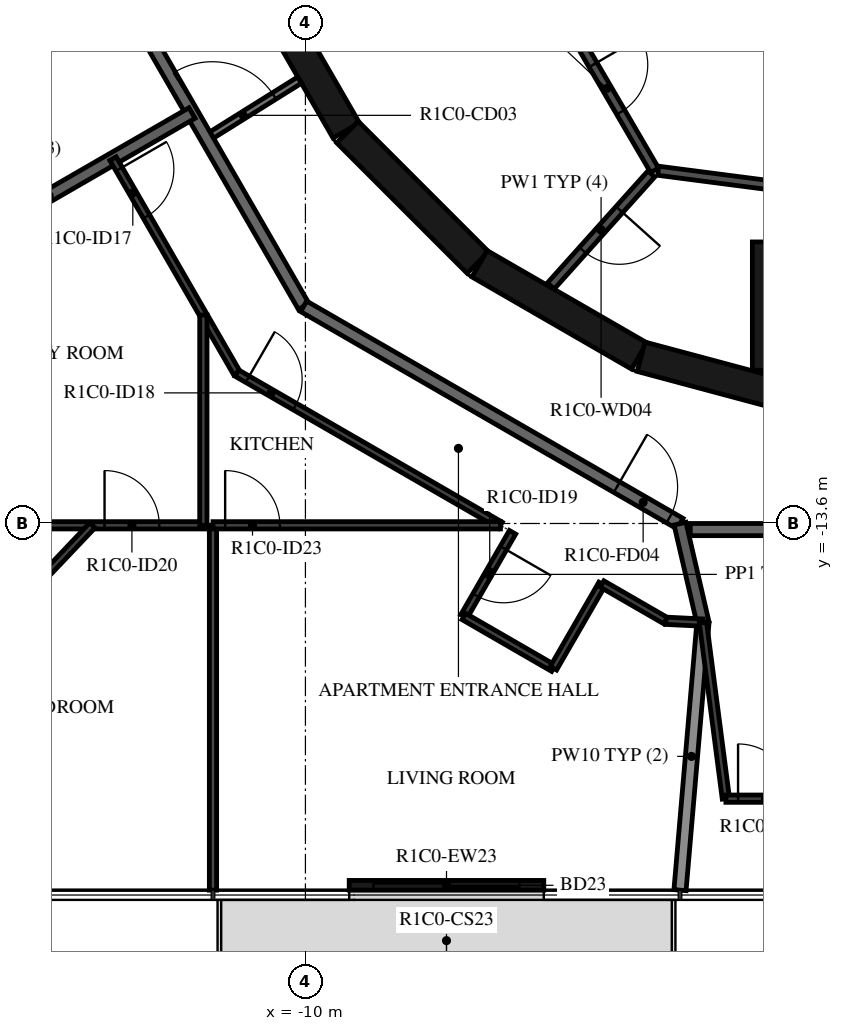
"""IFC4 building model, lengths in metres.
Left out: names, types, materials, properties, quantities, classifications, styles, units other than length and angle.
Written with IfcOpenShell. Run it as: python <this file> out.ifc"""

import sys

from ifc_helpers import new_model, si_unit, direction, frame, frame_2d, origin, place, context, subcontext, project, spatial, rectangle, extrude, element, fill, save


model = new_model("IFC4")
c1 = context("Model", 3, precision=1e-05, world=origin(), true_north=direction((0.0, 1.0)))
c2 = subcontext(c1, "Body", "Model", "MODEL_VIEW")
j1 = project(units=[si_unit("LENGTHUNIT", "METRE"), si_unit("PLANEANGLEUNIT", "RADIAN")], contexts=[c1])
p1 = place(None, origin())
s1 = spatial("IfcSite", under=j1, at=p1, CompositionType="ELEMENT")
p2 = place(p1, origin())
s2 = spatial("IfcBuilding", under=s1, at=p2, CompositionType="ELEMENT")
p3 = place(p2, frame((0.0, 0.0, 59.4)))
s3 = spatial("IfcBuildingStorey", under=s2, at=p3, CompositionType="ELEMENT", Elevation=59.4)
p4 = place(p3, frame((-9.28, -19.55, 0.0), z_axis=(0.0, 0.0, 1.0), x_axis=(1.0, 0.0, 0.0)))
e1 = element("IfcWall", 1, at=p4, inside=s3, PredefinedType="STANDARD", context=c2, shape_type="SweptSolid", body=[
    extrude(rectangle(XDim=3.2, YDim=0.16, at=frame_2d((1.6, 0.0))), origin(), (0.0, 0.0, 1.0), 3.12),
])
p5 = place(p4, frame((0.4, 0.0, 0.0)))
e2 = element("IfcOpeningElement", 2, at=p5, cuts=e1, PredefinedType="OPENING", context=c2, shape_type="SweptSolid", body=[
    extrude(rectangle(XDim=2.4, YDim=2.4, at=frame_2d((1.2, 1.2))), frame((0.0, 0.09, 0.0), z_axis=(0.0, -1.0, 0.0), x_axis=(1.0, 0.0, 0.0)), (0.0, 0.0, 1.0), 0.18),
])
p6 = place(p3, frame((-10.845, -4.51, 0.0), z_axis=(0.0, 0.0, 1.0), x_axis=(0.500087131594, -0.865975092491, 0.0)))
e3 = element("IfcWall", 3, at=p6, inside=s3, PredefinedType="SHEAR", context=c2, shape_type="SweptSolid", body=[
    extrude(rectangle(XDim=3.033, YDim=0.5, at=frame_2d((1.516, 0.0))), origin(), (0.0, 0.0, 1.0), 3.12),
])
p7 = place(p3, frame((-9.308, -7.164, 0.0), z_axis=(0.0, 0.0, 1.0), x_axis=(0.707106781187, -0.707106781187, 0.0)))
e4 = element("IfcWall", 4, at=p7, inside=s3, PredefinedType="SHEAR", context=c2, shape_type="SweptSolid", body=[
    extrude(rectangle(XDim=3.032, YDim=0.5, at=frame_2d((1.516, 0.0))), origin(), (0.0, 0.0, 1.0), 3.12),
])
for number, where, z_axis, x_axis in (
    (5, (-7.137, -9.329, 0.0), (0.0, 0.0, 1.0), (0.866, -0.5, 0.0)),
    (6, (-4.479, -10.858, 0.0), (0.0, 0.0, 1.0), (0.966, -0.259, 0.0)),
):
    element("IfcWall", number, at=place(p3, frame(where, z_axis=z_axis, x_axis=x_axis)), inside=s3, PredefinedType="SHEAR", context=c2, shape_type="SweptSolid", body=[
        extrude(rectangle(XDim=3.033, YDim=0.5, at=frame_2d((1.516, 0.0))), origin(), (0.0, 0.0, 1.0), 3.12),
    ])
p8 = place(p3, frame((-2.525, -8.97, 0.0), z_axis=(0.0, 0.0, 1.0), x_axis=(0.0, -1.0, 0.0)))
e7 = element("IfcWall", 7, at=p8, inside=s3, PredefinedType="SHEAR", context=c2, shape_type="SweptSolid", body=[
    extrude(rectangle(XDim=2.11, YDim=0.25, at=frame_2d((1.055, 0.0))), origin(), (0.0, 0.0, 1.0), 3.12),
])
p9 = place(p3, frame((-5.829, -5.102, 0.0), z_axis=(0.0, 0.0, 1.0), x_axis=(0.504480008384, -0.863423373057, 0.0)))
e8 = element("IfcWall", 8, at=p9, inside=s3, PredefinedType="PARTITIONING", context=c2, shape_type="SweptSolid", body=[
    extrude(rectangle(XDim=3.115, YDim=0.15, at=frame_2d((1.558, 0.0))), origin(), (0.0, 0.0, 1.0), 3.12),
])
p10 = place(p9, frame((1.107, 0.0, 0.0)))
e9 = element("IfcOpeningElement", 9, at=p10, cuts=e8, PredefinedType="OPENING", context=c2, shape_type="SweptSolid", body=[
    extrude(rectangle(XDim=0.9, YDim=2.1, at=frame_2d((0.45, 1.05))), frame((0.0, 0.085, 0.0), z_axis=(0.0, -1.0, 0.0), x_axis=(1.0, 0.0, 0.0)), (0.0, 0.0, 1.0), 0.17),
])
p11 = place(p3, frame((-4.311, -7.851, 0.0), z_axis=(0.0, 0.0, 1.0), x_axis=(-0.667869133096, -0.744278725383, 0.0)))
e10 = element("IfcWall", 10, at=p11, inside=s3, PredefinedType="PARTITIONING", context=c2, shape_type="SweptSolid", body=[
    extrude(rectangle(XDim=2.476, YDim=0.15, at=frame_2d((1.238, 0.0))), origin(), (0.0, 0.0, 1.0), 3.12),
])
p12 = place(p11, frame((0.788, 0.0, 0.0)))
e11 = element("IfcOpeningElement", 11, at=p12, cuts=e10, PredefinedType="OPENING", context=c2, shape_type="SweptSolid", body=[
    extrude(rectangle(XDim=0.9, YDim=2.1, at=frame_2d((0.45, 1.05))), frame((0.0, 0.085, 0.0), z_axis=(0.0, -1.0, 0.0), x_axis=(1.0, 0.0, 0.0)), (0.0, 0.0, 1.0), 0.17),
])
p13 = place(p3, frame((-4.198, -7.799, 0.0), z_axis=(0.0, 0.0, 1.0), x_axis=(0.991686747293, -0.128675542523, 0.0)))
e12 = element("IfcWall", 12, at=p13, inside=s3, PredefinedType="PARTITIONING", context=c2, shape_type="SweptSolid", body=[
    extrude(rectangle(XDim=1.793, YDim=0.15, at=frame_2d((0.896, 0.0))), origin(), (0.0, 0.0, 1.0), 3.12),
])
p14 = place(p3, frame((-11.625, -7.264, 0.0), z_axis=(0.0, 0.0, 1.0), x_axis=(0.84803632456, 0.529938102259, 0.0)))
e13 = element("IfcWall", 13, at=p14, inside=s3, PredefinedType="PARTITIONING", context=c2, shape_type="SweptSolid", body=[
    extrude(rectangle(XDim=1.804, YDim=0.12, at=frame_2d((0.902, 0.0))), origin(), (0.0, 0.0, 1.0), 3.12),
])
p15 = place(p14, frame((0.11, 0.0, 0.0)))
e14 = element("IfcOpeningElement", 14, at=p15, cuts=e13, PredefinedType="OPENING", context=c2, shape_type="SweptSolid", body=[
    extrude(rectangle(XDim=1.2, YDim=2.1, at=frame_2d((0.6, 1.05))), frame((0.0, 0.07, 0.0), z_axis=(0.0, -1.0, 0.0), x_axis=(1.0, 0.0, 0.0)), (0.0, 0.0, 1.0), 0.14),
])
p16 = place(p3, frame((-13.7, -3.671, 0.0), z_axis=(0.0, 0.0, 1.0), x_axis=(0.500001669485, -0.866024439905, 0.0)))
e15 = element("IfcWall", 15, at=p16, inside=s3, PredefinedType="STANDARD", context=c2, shape_type="SweptSolid", body=[
    extrude(rectangle(XDim=7.342, YDim=0.2, at=frame_2d((3.671, 0.0))), origin(), (0.0, 0.0, 1.0), 3.12),
])
p17 = place(p3, frame((-10.029, -10.029, 0.0), z_axis=(0.0, 0.0, 1.0), x_axis=(0.866022878987, -0.500004373052, 0.0)))
e16 = element("IfcWall", 16, at=p17, inside=s3, PredefinedType="STANDARD", context=c2, shape_type="SweptSolid", body=[
    extrude(rectangle(XDim=7.146, YDim=0.2, at=frame_2d((3.573, 0.0))), origin(), (0.0, 0.0, 1.0), 3.12),
])
p18 = place(p17, frame((5.947, 0.0, 0.0)))
e17 = element("IfcOpeningElement", 17, at=p18, cuts=e16, PredefinedType="OPENING", context=c2, shape_type="SweptSolid", body=[
    extrude(rectangle(XDim=1.0, YDim=2.1, at=frame_2d((0.5, 1.05))), frame((0.0, 0.11, 0.0), z_axis=(0.0, -1.0, 0.0), x_axis=(1.0, 0.0, 0.0)), (0.0, 0.0, 1.0), 0.22),
])
p19 = place(p3, frame((-3.671, -13.7, 0.0), z_axis=(0.0, 0.0, 1.0), x_axis=(1.0, 0.0, 0.0)))
e18 = element("IfcWall", 18, at=p19, inside=s3, PredefinedType="STANDARD", context=c2, shape_type="SweptSolid", body=[
    extrude(rectangle(XDim=7.342, YDim=0.2, at=frame_2d((3.671, 0.0))), origin(), (0.0, 0.0, 1.0), 3.12),
])
p20 = place(p19, frame((2.1, 0.0, 0.0)))
e19 = element("IfcOpeningElement", 19, at=p20, cuts=e18, PredefinedType="OPENING", context=c2, shape_type="SweptSolid", body=[
    extrude(rectangle(XDim=1.0, YDim=2.1, at=frame_2d((0.5, 1.05))), frame((0.0, 0.11, 0.0), z_axis=(0.0, -1.0, 0.0), x_axis=(1.0, 0.0, 0.0)), (0.0, 0.0, 1.0), 0.22),
])
p21 = place(p3, frame((-16.565, -9.564, 0.0), z_axis=(0.0, 0.0, 1.0), x_axis=(0.866028274568, 0.499995027624, 0.0)))
e20 = element("IfcWall", 20, at=p21, inside=s3, PredefinedType="STANDARD", context=c2, shape_type="SweptSolid", body=[
    extrude(rectangle(XDim=5.427, YDim=0.2, at=frame_2d((2.714, 0.0))), origin(), (0.0, 0.0, 1.0), 3.12),
])
p22 = place(p3, frame((-3.463, -15.23, 0.0), z_axis=(0.0, 0.0, 1.0), x_axis=(-0.225894501138, 0.974151771725, 0.0)))
e21 = element("IfcWall", 21, at=p22, inside=s3, PredefinedType="STANDARD", context=c2, shape_type="SweptSolid", body=[
    extrude(rectangle(XDim=1.671, YDim=0.2, at=frame_2d((0.835, 0.0))), origin(), (0.0, 0.0, 1.0), 3.12),
])
p23 = place(p3, frame((-3.84, -19.63, 0.0), z_axis=(0.0, 0.0, 1.0), x_axis=(0.085470135005, 0.996340732893, 0.0)))
e22 = element("IfcWall", 22, at=p23, inside=s3, PredefinedType="STANDARD", context=c2, shape_type="SweptSolid", body=[
    extrude(rectangle(XDim=4.416, YDim=0.2, at=frame_2d((2.208, 0.0))), origin(), (0.0, 0.0, 1.0), 2.73),
])
p24 = place(p3, frame((-13.164, -7.6, 0.0), z_axis=(0.0, 0.0, 1.0), x_axis=(0.500000928893, -0.866024867487, 0.0)))
e23 = element("IfcWall", 23, at=p24, inside=s3, PredefinedType="PARTITIONING", context=c2, shape_type="SweptSolid", body=[
    extrude(rectangle(XDim=4.073, YDim=0.12, at=frame_2d((2.036, 0.0))), origin(), (0.0, 0.0, 1.0), 3.12),
])
p25 = place(p24, frame((0.2, 0.0, 0.0)))
e24 = element("IfcOpeningElement", 24, at=p25, cuts=e23, PredefinedType="OPENING", context=c2, shape_type="SweptSolid", body=[
    extrude(rectangle(XDim=0.9, YDim=2.1, at=frame_2d((0.45, 1.05))), frame((0.0, 0.07, 0.0), z_axis=(0.0, -1.0, 0.0), x_axis=(1.0, 0.0, 0.0)), (0.0, 0.0, 1.0), 0.14),
])
p26 = place(p3, frame((-11.127, -11.127, 0.0), z_axis=(0.0, 0.0, 1.0), x_axis=(0.866034514313, -0.499984219769, 0.0)))
e25 = element("IfcWall", 25, at=p26, inside=s3, PredefinedType="PARTITIONING", context=c2, shape_type="SweptSolid", body=[
    extrude(rectangle(XDim=5.006, YDim=0.12, at=frame_2d((2.503, 0.0))), origin(), (0.0, 0.0, 1.0), 3.12),
])
p27 = place(p26, frame((0.2, 0.0, 0.0)))
e26 = element("IfcOpeningElement", 26, at=p27, cuts=e25, PredefinedType="OPENING", context=c2, shape_type="SweptSolid", body=[
    extrude(rectangle(XDim=0.9, YDim=2.1, at=frame_2d((0.45, 1.05))), frame((0.0, 0.07, 0.0), z_axis=(0.0, -1.0, 0.0), x_axis=(1.0, 0.0, 0.0)), (0.0, 0.0, 1.0), 0.14),
])
p28 = place(p3, frame((-6.594, -13.744, 0.0), z_axis=(0.0, 0.0, 1.0), x_axis=(-0.499947031044, -0.866055983265, 0.0)))
e27 = element("IfcWall", 27, at=p28, inside=s3, PredefinedType="PARTITIONING", context=c2, shape_type="SweptSolid", body=[
    extrude(rectangle(XDim=1.6, YDim=0.12, at=frame_2d((0.8, 0.0))), origin(), (0.0, 0.0, 1.0), 3.12),
])
p29 = place(p28, frame((0.3, 0.0, 0.0)))
e28 = element("IfcOpeningElement", 28, at=p29, cuts=e27, PredefinedType="OPENING", context=c2, shape_type="SweptSolid", body=[
    extrude(rectangle(XDim=0.9, YDim=2.1, at=frame_2d((0.45, 1.05))), frame((0.0, 0.07, 0.0), z_axis=(0.0, -1.0, 0.0), x_axis=(1.0, 0.0, 0.0)), (0.0, 0.0, 1.0), 0.14),
])
p30 = place(p3, frame((-7.394, -15.13, 0.0), z_axis=(0.0, 0.0, 1.0), x_axis=(0.86605165483, -0.499954529098, 0.0)))
e29 = element("IfcWall", 29, at=p30, inside=s3, PredefinedType="PARTITIONING", context=c2, shape_type="SweptSolid", body=[
    extrude(rectangle(XDim=1.7, YDim=0.12, at=frame_2d((0.85, 0.0))), origin(), (0.0, 0.0, 1.0), 3.12),
])
p31 = place(p3, frame((-5.922, -15.98, 0.0), z_axis=(0.0, 0.0, 1.0), x_axis=(0.500013115284, 0.866017831539, 0.0)))
e30 = element("IfcWall", 30, at=p31, inside=s3, PredefinedType="PARTITIONING", context=c2, shape_type="SweptSolid", body=[
    extrude(rectangle(XDim=1.6, YDim=0.12, at=frame_2d((0.8, 0.0))), origin(), (0.0, 0.0, 1.0), 3.12),
])
p32 = place(p3, frame((-5.122, -14.594, 0.0), z_axis=(0.0, 0.0, 1.0), x_axis=(0.86610168388, -0.499867855718, 0.0)))
e31 = element("IfcWall", 31, at=p32, inside=s3, PredefinedType="PARTITIONING", context=c2, shape_type="SweptSolid", body=[
    extrude(rectangle(XDim=1.211, YDim=0.12, at=frame_2d((0.605, 0.0))), origin(), (0.0, 0.0, 1.0), 3.12),
])
p33 = place(p3, frame((-4.073, -15.2, 0.0), z_axis=(0.0, 0.0, 1.0), x_axis=(0.99879090756, -0.049160176723, 0.0)))
e32 = element("IfcWall", 32, at=p33, inside=s3, PredefinedType="PARTITIONING", context=c2, shape_type="SweptSolid", body=[
    extrude(rectangle(XDim=0.611, YDim=0.12, at=frame_2d((0.305, 0.0))), origin(), (0.0, 0.0, 1.0), 3.12),
])
p34 = place(p3, frame((-19.794, -13.63, 0.0), z_axis=(0.0, 0.0, 1.0), x_axis=(1.0, 0.0, 0.0)))
e33 = element("IfcWall", 33, at=p34, inside=s3, PredefinedType="PARTITIONING", context=c2, shape_type="SweptSolid", body=[
    extrude(rectangle(XDim=8.156, YDim=0.12, at=frame_2d((4.078, 0.0))), origin(), (0.0, 0.0, 1.0), 3.12),
])
p35 = place(p34, frame((6.491, 0.0, 0.0)))
e34 = element("IfcOpeningElement", 34, at=p35, cuts=e33, PredefinedType="OPENING", context=c2, shape_type="SweptSolid", body=[
    extrude(rectangle(XDim=0.9, YDim=2.1, at=frame_2d((0.45, 1.05))), frame((0.0, 0.07, 0.0), z_axis=(0.0, -1.0, 0.0), x_axis=(1.0, 0.0, 0.0)), (0.0, 0.0, 1.0), 0.14),
])
p36 = place(p3, frame((-11.678, -13.63, 0.0), z_axis=(0.0, 0.0, 1.0), x_axis=(0.0, 1.0, 0.0)))
e35 = element("IfcWall", 35, at=p36, inside=s3, PredefinedType="PARTITIONING", context=c2, shape_type="SweptSolid", body=[
    extrude(rectangle(XDim=3.458, YDim=0.12, at=frame_2d((1.729, 0.0))), origin(), (0.0, 0.0, 1.0), 3.12),
])
p37 = place(p3, frame((-19.2, -19.63, 0.0), z_axis=(0.0, 0.0, 1.0), x_axis=(0.688544699396, 0.72519390299, 0.0)))
e36 = element("IfcWall", 36, at=p37, inside=s3, PredefinedType="PARTITIONING", context=c2, shape_type="SweptSolid", body=[
    extrude(rectangle(XDim=8.274, YDim=0.12, at=frame_2d((4.137, 0.0))), origin(), (0.0, 0.0, 1.0), 3.12),
])
p38 = place(p37, frame((0.8, 0.0, 0.0)))
e37 = element("IfcOpeningElement", 37, at=p38, cuts=e36, PredefinedType="OPENING", context=c2, shape_type="SweptSolid", body=[
    extrude(rectangle(XDim=0.9, YDim=2.1, at=frame_2d((0.45, 1.05))), frame((0.0, 0.07, 0.0), z_axis=(0.0, -1.0, 0.0), x_axis=(1.0, 0.0, 0.0)), (0.0, 0.0, 1.0), 0.14),
])
p39 = place(p3, frame((-11.52, -19.63, 0.0), z_axis=(0.0, 0.0, 1.0), x_axis=(0.0, 1.0, 0.0)))
e38 = element("IfcWall", 38, at=p39, inside=s3, PredefinedType="PARTITIONING", context=c2, shape_type="SweptSolid", body=[
    extrude(rectangle(XDim=6.0, YDim=0.12, at=frame_2d((3.0, 0.0))), origin(), (0.0, 0.0, 1.0), 2.73),
])
p40 = place(p3, frame((-11.52, -13.63, 0.0), z_axis=(0.0, 0.0, 1.0), x_axis=(1.0, 0.0, 0.0)))
e39 = element("IfcWall", 39, at=p40, inside=s3, PredefinedType="PARTITIONING", context=c2, shape_type="SweptSolid", body=[
    extrude(rectangle(XDim=4.728, YDim=0.12, at=frame_2d((2.364, 0.0))), origin(), (0.0, 0.0, 1.0), 3.12),
])
p41 = place(p40, frame((0.2, 0.0, 0.0)))
e40 = element("IfcOpeningElement", 40, at=p41, cuts=e39, PredefinedType="OPENING", context=c2, shape_type="SweptSolid", body=[
    extrude(rectangle(XDim=0.9, YDim=2.1, at=frame_2d((0.45, 1.05))), frame((0.0, 0.07, 0.0), z_axis=(0.0, -1.0, 0.0), x_axis=(1.0, 0.0, 0.0)), (0.0, 0.0, 1.0), 0.14),
])
p42 = place(p3, frame((-3.463, -15.23, 0.0), z_axis=(0.0, 0.0, 1.0), x_axis=(0.129260547059, -0.991610665016, 0.0)))
e41 = element("IfcWall", 41, at=p42, inside=s3, PredefinedType="PARTITIONING", context=c2, shape_type="SweptSolid", body=[
    extrude(rectangle(XDim=2.92, YDim=0.12, at=frame_2d((1.46, 0.0))), origin(), (0.0, 0.0, 1.0), 3.12),
])
p43 = place(p3, frame((-3.085, -18.125, 0.0), z_axis=(0.0, 0.0, 1.0), x_axis=(1.0, 0.0, 0.0)))
e42 = element("IfcWall", 42, at=p43, inside=s3, PredefinedType="PARTITIONING", context=c2, shape_type="SweptSolid", body=[
    extrude(rectangle(XDim=3.3, YDim=0.12, at=frame_2d((1.65, 0.0))), origin(), (0.0, 0.0, 1.0), 3.12),
])
p44 = place(p43, frame((0.2, 0.0, 0.0)))
e43 = element("IfcOpeningElement", 43, at=p44, cuts=e42, PredefinedType="OPENING", context=c2, shape_type="SweptSolid", body=[
    extrude(rectangle(XDim=0.9, YDim=2.1, at=frame_2d((0.45, 1.05))), frame((0.0, 0.07, 0.0), z_axis=(0.0, -1.0, 0.0), x_axis=(1.0, 0.0, 0.0)), (0.0, 0.0, 1.0), 0.14),
])
p45 = place(p5, origin())
e44 = element("IfcDoor", 44, at=p45, inside=s3, OperationType="DOUBLE_DOOR_SLIDING", PredefinedType="DOOR", context=c2, shape_type="SweptSolid", body=[
    extrude(rectangle(XDim=2.4, YDim=2.4, at=frame_2d((1.2, 1.2))), frame((0.0, 0.025, 0.0), z_axis=(0.0, -1.0, 0.0), x_axis=(1.0, 0.0, 0.0)), (0.0, 0.0, 1.0), 0.05),
])
fill(e2, e44)
p46 = place(p12, origin())
e45 = element("IfcDoor", 45, at=p46, inside=s3, OperationType="SINGLE_SWING_LEFT", PredefinedType="DOOR", context=c2, shape_type="SweptSolid", body=[
    extrude(rectangle(XDim=0.9, YDim=2.1, at=frame_2d((0.45, 1.05))), frame((0.0, 0.025, 0.0), z_axis=(0.0, -1.0, 0.0), x_axis=(1.0, 0.0, 0.0)), (0.0, 0.0, 1.0), 0.05),
])
fill(e11, e45)
p47 = place(p10, origin())
e46 = element("IfcDoor", 46, at=p47, inside=s3, OperationType="SINGLE_SWING_RIGHT", PredefinedType="DOOR", context=c2, shape_type="SweptSolid", body=[
    extrude(rectangle(XDim=0.9, YDim=2.1, at=frame_2d((0.45, 1.05))), frame((0.0, 0.025, 0.0), z_axis=(0.0, -1.0, 0.0), x_axis=(1.0, 0.0, 0.0)), (0.0, 0.0, 1.0), 0.05),
])
fill(e9, e46)
p48 = place(p18, origin())
e47 = element("IfcDoor", 47, at=p48, inside=s3, OperationType="SINGLE_SWING_LEFT", PredefinedType="DOOR", context=c2, shape_type="SweptSolid", body=[
    extrude(rectangle(XDim=1.0, YDim=2.1, at=frame_2d((0.5, 1.05))), frame((0.0, 0.025, 0.0), z_axis=(0.0, -1.0, 0.0), x_axis=(1.0, 0.0, 0.0)), (0.0, 0.0, 1.0), 0.05),
])
fill(e17, e47)
p49 = place(p25, origin())
e48 = element("IfcDoor", 48, at=p49, inside=s3, OperationType="SINGLE_SWING_LEFT", PredefinedType="DOOR", context=c2, shape_type="SweptSolid", body=[
    extrude(rectangle(XDim=0.9, YDim=2.1, at=frame_2d((0.45, 1.05))), frame((0.0, 0.025, 0.0), z_axis=(0.0, -1.0, 0.0), x_axis=(1.0, 0.0, 0.0)), (0.0, 0.0, 1.0), 0.05),
])
fill(e24, e48)
p50 = place(p27, origin())
e49 = element("IfcDoor", 49, at=p50, inside=s3, OperationType="SINGLE_SWING_LEFT", PredefinedType="DOOR", context=c2, shape_type="SweptSolid", body=[
    extrude(rectangle(XDim=0.9, YDim=2.1, at=frame_2d((0.45, 1.05))), frame((0.0, 0.025, 0.0), z_axis=(0.0, -1.0, 0.0), x_axis=(1.0, 0.0, 0.0)), (0.0, 0.0, 1.0), 0.05),
])
fill(e26, e49)
p51 = place(p29, origin())
e50 = element("IfcDoor", 50, at=p51, inside=s3, OperationType="SINGLE_SWING_RIGHT", PredefinedType="DOOR", context=c2, shape_type="SweptSolid", body=[
    extrude(rectangle(XDim=0.9, YDim=2.1, at=frame_2d((0.45, 1.05))), frame((0.0, 0.025, 0.0), z_axis=(0.0, -1.0, 0.0), x_axis=(1.0, 0.0, 0.0)), (0.0, 0.0, 1.0), 0.05),
])
fill(e28, e50)
p52 = place(p35, origin())
e51 = element("IfcDoor", 51, at=p52, inside=s3, OperationType="SINGLE_SWING_LEFT", PredefinedType="DOOR", context=c2, shape_type="SweptSolid", body=[
    extrude(rectangle(XDim=0.9, YDim=2.1, at=frame_2d((0.45, 1.05))), frame((0.0, 0.025, 0.0), z_axis=(0.0, -1.0, 0.0), x_axis=(1.0, 0.0, 0.0)), (0.0, 0.0, 1.0), 0.05),
])
fill(e34, e51)
p53 = place(p41, origin())
e52 = element("IfcDoor", 52, at=p53, inside=s3, OperationType="SINGLE_SWING_RIGHT", PredefinedType="DOOR", context=c2, shape_type="SweptSolid", body=[
    extrude(rectangle(XDim=0.9, YDim=2.1, at=frame_2d((0.45, 1.05))), frame((0.0, 0.025, 0.0), z_axis=(0.0, -1.0, 0.0), x_axis=(1.0, 0.0, 0.0)), (0.0, 0.0, 1.0), 0.05),
])
fill(e40, e52)
p54 = place(p44, origin())
e53 = element("IfcDoor", 53, at=p54, inside=s3, OperationType="SINGLE_SWING_LEFT", PredefinedType="DOOR", context=c2, shape_type="SweptSolid", body=[
    extrude(rectangle(XDim=0.9, YDim=2.1, at=frame_2d((0.45, 1.05))), frame((0.0, 0.025, 0.0), z_axis=(0.0, -1.0, 0.0), x_axis=(1.0, 0.0, 0.0)), (0.0, 0.0, 1.0), 0.05),
])
fill(e43, e53)
p55 = place(p15, origin())
e54 = element("IfcDoor", 54, at=p55, inside=s3, OperationType="DOUBLE_DOOR_SINGLE_SWING", PredefinedType="DOOR", context=c2, shape_type="SweptSolid", body=[
    extrude(rectangle(XDim=1.2, YDim=2.1, at=frame_2d((0.6, 1.05))), frame((0.0, 0.025, 0.0), z_axis=(0.0, -1.0, 0.0), x_axis=(1.0, 0.0, 0.0)), (0.0, 0.0, 1.0), 0.05),
])
fill(e14, e54)
save(model, sys.argv[1])
